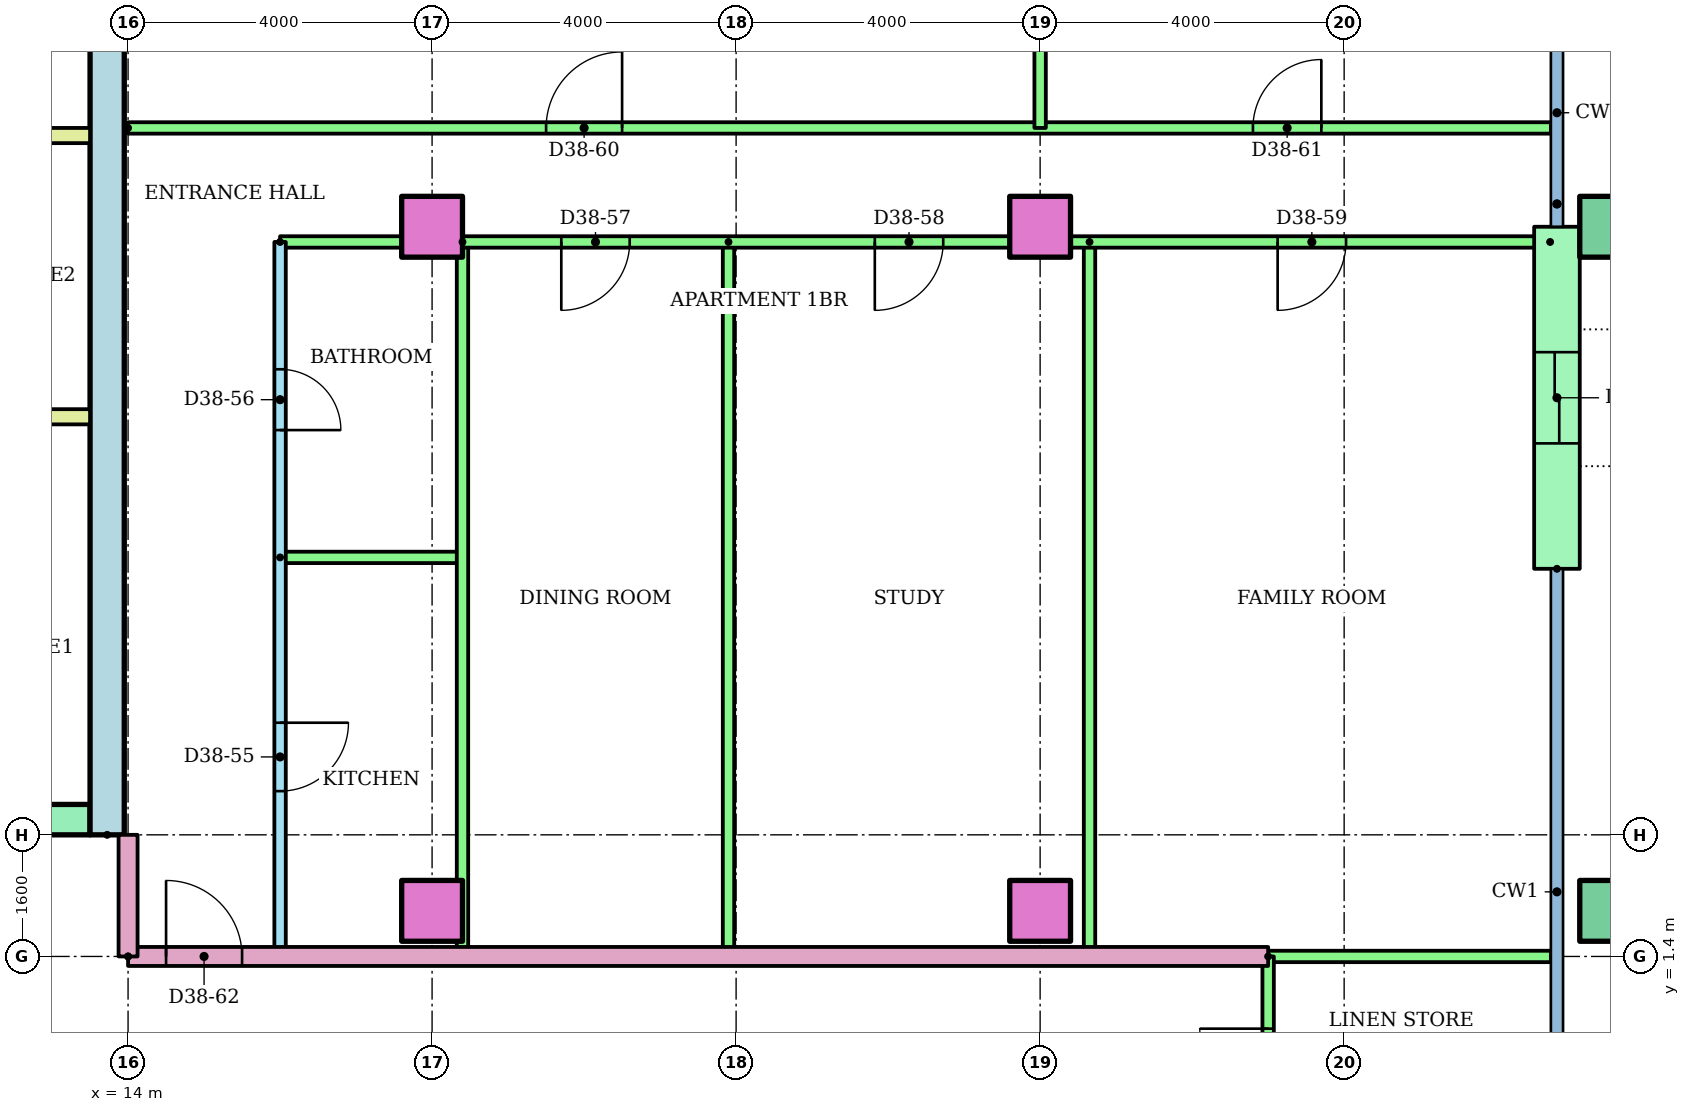
"""IFC4 building model, lengths in metres.
Left out: names, types, materials, properties, quantities, classifications, styles, units other than length and angle.
Written with IfcOpenShell. Run it as: python <this file> out.ifc"""

import sys

from ifc_helpers import new_model, si_unit, direction, frame, frame_2d, origin, origin_2d, place, context, subcontext, project, spatial, rectangle, hollow_rectangle, extrude, element, fill, save


model = new_model("IFC4")
c1 = context("Model", 3, precision=1e-05, world=origin(), true_north=direction((0.0, 1.0)))
c2 = subcontext(c1, "Body", "Model", "MODEL_VIEW")
j1 = project(units=[si_unit("LENGTHUNIT", "METRE"), si_unit("PLANEANGLEUNIT", "RADIAN")], contexts=[c1])
p1 = place(None, origin())
s1 = spatial("IfcSite", under=j1, at=p1, CompositionType="ELEMENT")
p2 = place(p1, origin())
s2 = spatial("IfcBuilding", under=s1, at=p2, CompositionType="ELEMENT")
p3 = place(p2, frame((0.0, 0.0, 145.4)))
s3 = spatial("IfcBuildingStorey", under=s2, at=p3, CompositionType="ELEMENT", Elevation=145.4)
for number, where in (
    (1, (18.0, 2.0, 0.0)),
    (2, (26.0, 2.0, 0.0)),
):
    element("IfcColumn", number, at=place(p3, frame(where)), inside=s3, PredefinedType="COLUMN", context=c2, shape_type="SweptSolid", body=[
        extrude(rectangle(XDim=0.8, YDim=0.8, at=origin_2d()), origin(), (0.0, 0.0, 1.0), 3.2),
    ])
p4 = place(p3, frame((33.5, 2.0, 0.0)))
e3 = element("IfcColumn", 3, at=p4, inside=s3, PredefinedType="COLUMN", context=c2, shape_type="SweptSolid", body=[
    extrude(hollow_rectangle(XDim=0.8, YDim=0.8, WallThickness=0.04, at=origin_2d()), origin(), (0.0, 0.0, 1.0), 3.2),
])
for number, where in (
    (4, (18.0, 11.0, 0.0)),
    (5, (26.0, 11.0, 0.0)),
):
    element("IfcColumn", number, at=place(p3, frame(where)), inside=s3, PredefinedType="COLUMN", context=c2, shape_type="SweptSolid", body=[
        extrude(rectangle(XDim=0.8, YDim=0.8, at=origin_2d()), origin(), (0.0, 0.0, 1.0), 3.2),
    ])
p5 = place(p3, frame((33.5, 11.0, 0.0)))
e6 = element("IfcColumn", 6, at=p5, inside=s3, PredefinedType="COLUMN", context=c2, shape_type="SweptSolid", body=[
    extrude(hollow_rectangle(XDim=0.8, YDim=0.8, WallThickness=0.04, at=origin_2d()), origin(), (0.0, 0.0, 1.0), 3.2),
])
p6 = place(p3, frame((32.8, 6.5, 0.0), z_axis=(0.0, 0.0, 1.0), x_axis=(0.0, 1.0, 0.0)))
e7 = element("IfcWall", 7, at=p6, inside=s3, PredefinedType="STANDARD", context=c2, shape_type="SweptSolid", body=[
    extrude(rectangle(XDim=4.5, YDim=0.6, at=frame_2d((2.25, 0.0))), origin(), (0.0, 0.0, 1.0), 2.92),
])
p7 = place(p6, frame((1.65, 0.0, 0.0)))
e8 = element("IfcOpeningElement", 8, at=p7, cuts=e7, PredefinedType="OPENING", context=c2, shape_type="SweptSolid", body=[
    extrude(rectangle(XDim=1.2, YDim=2.1, at=frame_2d((0.6, 1.05))), frame((0.0, 0.31, 0.0), z_axis=(0.0, -1.0, 0.0), x_axis=(1.0, 0.0, 0.0)), (0.0, 0.0, 1.0), 0.62),
])
p8 = place(p3, frame((13.725, 3.0, 0.0), z_axis=(0.0, 0.0, 1.0), x_axis=(0.0, 1.0, 0.0)))
e9 = element("IfcWall", 9, at=p8, inside=s3, PredefinedType="SHEAR", context=c2, shape_type="SweptSolid", body=[
    extrude(rectangle(XDim=17.0, YDim=0.45, at=frame_2d((8.5, 0.0))), origin(), (0.0, 0.0, 1.0), 2.92),
])
p9 = place(p3, frame((-13.5, 3.2, 0.0)))
e10 = element("IfcWall", 10, at=p9, inside=s3, PredefinedType="SHEAR", context=c2, shape_type="SweptSolid", body=[
    extrude(rectangle(XDim=27.0, YDim=0.4, at=frame_2d((13.5, 0.0))), origin(), (0.0, 0.0, 1.0), 2.92),
])
p10 = place(p9, frame((6.861, 0.0, 0.0)))
e11 = element("IfcOpeningElement", 11, at=p10, cuts=e10, PredefinedType="OPENING", context=c2, shape_type="SweptSolid", body=[
    extrude(rectangle(XDim=1.1, YDim=2.1, at=frame_2d((0.55, 1.05))), frame((0.0, 0.21, 0.0), z_axis=(0.0, -1.0, 0.0), x_axis=(1.0, 0.0, 0.0)), (0.0, 0.0, 1.0), 0.42),
])
p11 = place(p9, frame((9.906, 0.0, 0.0)))
e12 = element("IfcOpeningElement", 12, at=p11, cuts=e10, PredefinedType="OPENING", context=c2, shape_type="SweptSolid", body=[
    extrude(rectangle(XDim=1.1, YDim=2.1, at=frame_2d((0.55, 1.05))), frame((0.0, 0.21, 0.0), z_axis=(0.0, -1.0, 0.0), x_axis=(1.0, 0.0, 0.0)), (0.0, 0.0, 1.0), 0.42),
])
p12 = place(p9, frame((15.994, 0.0, 0.0)))
e13 = element("IfcOpeningElement", 13, at=p12, cuts=e10, PredefinedType="OPENING", context=c2, shape_type="SweptSolid", body=[
    extrude(rectangle(XDim=1.1, YDim=2.1, at=frame_2d((0.55, 1.05))), frame((0.0, 0.21, 0.0), z_axis=(0.0, -1.0, 0.0), x_axis=(1.0, 0.0, 0.0)), (0.0, 0.0, 1.0), 0.42),
])
p13 = place(p9, frame((19.039, 0.0, 0.0)))
e14 = element("IfcOpeningElement", 14, at=p13, cuts=e10, PredefinedType="OPENING", context=c2, shape_type="SweptSolid", body=[
    extrude(rectangle(XDim=1.1, YDim=2.1, at=frame_2d((0.55, 1.05))), frame((0.0, 0.21, 0.0), z_axis=(0.0, -1.0, 0.0), x_axis=(1.0, 0.0, 0.0)), (0.0, 0.0, 1.0), 0.42),
])
p14 = place(p9, frame((12.6, 0.0, 0.0)))
e15 = element("IfcOpeningElement", 15, at=p14, cuts=e10, PredefinedType="OPENING", context=c2, shape_type="SweptSolid", body=[
    extrude(rectangle(XDim=1.8, YDim=2.1, at=frame_2d((0.9, 1.05))), frame((0.0, 0.21, 0.0), z_axis=(0.0, -1.0, 0.0), x_axis=(1.0, 0.0, 0.0)), (0.0, 0.0, 1.0), 0.42),
])
for number, where in (
    (16, (9.6, 8.5, 0.0)),
    (17, (9.6, 12.2, 0.0)),
):
    element("IfcWall", number, at=place(p3, frame(where)), inside=s3, PredefinedType="PARTITIONING", context=c2, shape_type="SweptSolid", body=[
        extrude(rectangle(XDim=3.9, YDim=0.2, at=frame_2d((1.95, 0.0))), origin(), (0.0, 0.0, 1.0), 2.92),
    ])
p15 = place(p3, frame((16.0, 10.8, 0.0), z_axis=(0.0, 0.0, 1.0), x_axis=(0.0, -1.0, 0.0)))
e18 = element("IfcWall", 18, at=p15, inside=s3, PredefinedType="PARTITIONING", context=c2, shape_type="SweptSolid", body=[
    extrude(rectangle(XDim=9.4, YDim=0.15, at=frame_2d((4.7, 0.0))), origin(), (0.0, 0.0, 1.0), 2.4),
])
p16 = place(p15, frame((6.325, 0.0, 0.0)))
e19 = element("IfcOpeningElement", 19, at=p16, cuts=e18, PredefinedType="OPENING", context=c2, shape_type="SweptSolid", body=[
    extrude(rectangle(XDim=0.9, YDim=2.1, at=frame_2d((0.45, 1.05))), frame((0.0, 0.085, 0.0), z_axis=(0.0, -1.0, 0.0), x_axis=(1.0, 0.0, 0.0)), (0.0, 0.0, 1.0), 0.17),
])
p17 = place(p15, frame((1.675, 0.0, 0.0)))
e20 = element("IfcOpeningElement", 20, at=p17, cuts=e18, PredefinedType="OPENING", context=c2, shape_type="SweptSolid", body=[
    extrude(rectangle(XDim=0.8, YDim=2.1, at=frame_2d((0.4, 1.05))), frame((0.0, 0.085, 0.0), z_axis=(0.0, -1.0, 0.0), x_axis=(1.0, 0.0, 0.0)), (0.0, 0.0, 1.0), 0.17),
])
p18 = place(p3, frame((16.0, 6.65, 0.0)))
e21 = element("IfcWall", 21, at=p18, inside=s3, PredefinedType="PARTITIONING", context=c2, shape_type="SweptSolid", body=[
    extrude(rectangle(XDim=2.4, YDim=0.15, at=frame_2d((1.2, 0.0))), origin(), (0.0, 0.0, 1.0), 2.4),
])
for number, where, z_axis, x_axis in (
    (22, (18.4, 10.8, 0.0), (0.0, 0.0, 1.0), (0.0, -1.0, 0.0)),
    (23, (21.9, 10.8, 0.0), (0.0, 0.0, 1.0), (0.0, -1.0, 0.0)),
    (24, (26.65, 10.8, 0.0), (0.0, 0.0, 1.0), (0.0, -1.0, 0.0)),
):
    element("IfcWall", number, at=place(p3, frame(where, z_axis=z_axis, x_axis=x_axis)), inside=s3, PredefinedType="PARTITIONING", context=c2, shape_type="SweptSolid", body=[
        extrude(rectangle(XDim=9.4, YDim=0.15, at=frame_2d((4.7, 0.0))), origin(), (0.0, 0.0, 1.0), 2.4),
    ])
p19 = place(p3, frame((32.71, 10.8, 0.0), z_axis=(0.0, 0.0, 1.0), x_axis=(-1.0, 0.0, 0.0)))
e25 = element("IfcWall", 25, at=p19, inside=s3, PredefinedType="PARTITIONING", context=c2, shape_type="SweptSolid", body=[
    extrude(rectangle(XDim=16.71, YDim=0.15, at=frame_2d((8.355, 0.0))), origin(), (0.0, 0.0, 1.0), 2.4),
])
p20 = place(p19, frame((12.11, 0.0, 0.0)))
e26 = element("IfcOpeningElement", 26, at=p20, cuts=e25, PredefinedType="OPENING", context=c2, shape_type="SweptSolid", body=[
    extrude(rectangle(XDim=0.9, YDim=2.1, at=frame_2d((0.45, 1.05))), frame((0.0, 0.085, 0.0), z_axis=(0.0, -1.0, 0.0), x_axis=(1.0, 0.0, 0.0)), (0.0, 0.0, 1.0), 0.17),
])
p21 = place(p19, frame((7.985, 0.0, 0.0)))
e27 = element("IfcOpeningElement", 27, at=p21, cuts=e25, PredefinedType="OPENING", context=c2, shape_type="SweptSolid", body=[
    extrude(rectangle(XDim=0.9, YDim=2.1, at=frame_2d((0.45, 1.05))), frame((0.0, 0.085, 0.0), z_axis=(0.0, -1.0, 0.0), x_axis=(1.0, 0.0, 0.0)), (0.0, 0.0, 1.0), 0.17),
])
p22 = place(p19, frame((2.685, 0.0, 0.0)))
e28 = element("IfcOpeningElement", 28, at=p22, cuts=e25, PredefinedType="OPENING", context=c2, shape_type="SweptSolid", body=[
    extrude(rectangle(XDim=0.9, YDim=2.1, at=frame_2d((0.45, 1.05))), frame((0.0, 0.085, 0.0), z_axis=(0.0, -1.0, 0.0), x_axis=(1.0, 0.0, 0.0)), (0.0, 0.0, 1.0), 0.17),
])
p23 = place(p3, frame((14.0, 12.3, 0.0)))
e29 = element("IfcWall", 29, at=p23, inside=s3, PredefinedType="PARTITIONING", context=c2, shape_type="SweptSolid", body=[
    extrude(rectangle(XDim=18.72, YDim=0.15, at=frame_2d((9.36, 0.0))), origin(), (0.0, 0.0, 1.0), 2.4),
])
p24 = place(p23, frame((5.5, 0.0, 0.0)))
e30 = element("IfcOpeningElement", 30, at=p24, cuts=e29, PredefinedType="OPENING", context=c2, shape_type="SweptSolid", body=[
    extrude(rectangle(XDim=1.0, YDim=2.1, at=frame_2d((0.5, 1.05))), frame((0.0, 0.085, 0.0), z_axis=(0.0, -1.0, 0.0), x_axis=(1.0, 0.0, 0.0)), (0.0, 0.0, 1.0), 0.17),
])
p25 = place(p23, frame((14.8, 0.0, 0.0)))
e31 = element("IfcOpeningElement", 31, at=p25, cuts=e29, PredefinedType="OPENING", context=c2, shape_type="SweptSolid", body=[
    extrude(rectangle(XDim=0.9, YDim=2.1, at=frame_2d((0.45, 1.05))), frame((0.0, 0.085, 0.0), z_axis=(0.0, -1.0, 0.0), x_axis=(1.0, 0.0, 0.0)), (0.0, 0.0, 1.0), 0.17),
])
p26 = place(p3, frame((26.0, 18.721, 0.0), z_axis=(0.0, 0.0, 1.0), x_axis=(0.0, -1.0, 0.0)))
e32 = element("IfcWall", 32, at=p26, inside=s3, PredefinedType="PARTITIONING", context=c2, shape_type="SweptSolid", body=[
    extrude(rectangle(XDim=6.421, YDim=0.15, at=frame_2d((3.21, 0.0))), origin(), (0.0, 0.0, 1.0), 2.4),
])
p27 = place(p3, frame((14.0, 1.4, 0.0)))
e33 = element("IfcWall", 33, at=p27, inside=s3, PredefinedType="PARTITIONING", context=c2, shape_type="SweptSolid", body=[
    extrude(rectangle(XDim=15.0, YDim=0.25, at=frame_2d((7.5, 0.0))), origin(), (0.0, 0.0, 1.0), 2.4),
])
p28 = place(p27, frame((0.5, 0.0, 0.0)))
e34 = element("IfcOpeningElement", 34, at=p28, cuts=e33, PredefinedType="OPENING", context=c2, shape_type="SweptSolid", body=[
    extrude(rectangle(XDim=1.0, YDim=2.1, at=frame_2d((0.5, 1.05))), frame((0.0, 0.135, 0.0), z_axis=(0.0, -1.0, 0.0), x_axis=(1.0, 0.0, 0.0)), (0.0, 0.0, 1.0), 0.27),
])
p29 = place(p3, frame((29.0, 1.4, 0.0)))
e35 = element("IfcWall", 35, at=p29, inside=s3, PredefinedType="PARTITIONING", context=c2, shape_type="SweptSolid", body=[
    extrude(rectangle(XDim=3.72, YDim=0.15, at=frame_2d((1.86, 0.0))), origin(), (0.0, 0.0, 1.0), 2.4),
])
p30 = place(p3, frame((29.0, -1.4, 0.0), z_axis=(0.0, 0.0, 1.0), x_axis=(0.0, 1.0, 0.0)))
e36 = element("IfcWall", 36, at=p30, inside=s3, PredefinedType="PARTITIONING", context=c2, shape_type="SweptSolid", body=[
    extrude(rectangle(XDim=2.8, YDim=0.15, at=frame_2d((1.4, 0.0))), origin(), (0.0, 0.0, 1.0), 2.4),
])
p31 = place(p30, frame((0.95, 0.0, 0.0)))
e37 = element("IfcOpeningElement", 37, at=p31, cuts=e36, PredefinedType="OPENING", context=c2, shape_type="SweptSolid", body=[
    extrude(rectangle(XDim=0.9, YDim=2.1, at=frame_2d((0.45, 1.05))), frame((0.0, 0.085, 0.0), z_axis=(0.0, -1.0, 0.0), x_axis=(1.0, 0.0, 0.0)), (0.0, 0.0, 1.0), 0.17),
])
p32 = place(p3, frame((14.0, 1.4, 0.0), z_axis=(0.0, 0.0, 1.0), x_axis=(0.0, 1.0, 0.0)))
e38 = element("IfcWall", 38, at=p32, inside=s3, PredefinedType="PARTITIONING", context=c2, shape_type="SweptSolid", body=[
    extrude(rectangle(XDim=1.6, YDim=0.25, at=frame_2d((0.8, 0.0))), origin(), (0.0, 0.0, 1.0), 2.4),
])
p33 = place(p16, origin())
e39 = element("IfcDoor", 39, at=p33, inside=s3, OperationType="SINGLE_SWING_LEFT", PredefinedType="DOOR", context=c2, shape_type="SweptSolid", body=[
    extrude(rectangle(XDim=0.9, YDim=2.1, at=frame_2d((0.45, 1.05))), frame((0.0, 0.025, 0.0), z_axis=(0.0, -1.0, 0.0), x_axis=(1.0, 0.0, 0.0)), (0.0, 0.0, 1.0), 0.05),
])
fill(e19, e39)
p34 = place(p17, origin())
e40 = element("IfcDoor", 40, at=p34, inside=s3, OperationType="SINGLE_SWING_RIGHT", PredefinedType="DOOR", context=c2, shape_type="SweptSolid", body=[
    extrude(rectangle(XDim=0.8, YDim=2.1, at=frame_2d((0.4, 1.05))), frame((0.0, 0.025, 0.0), z_axis=(0.0, -1.0, 0.0), x_axis=(1.0, 0.0, 0.0)), (0.0, 0.0, 1.0), 0.05),
])
fill(e20, e40)
p35 = place(p20, origin())
e41 = element("IfcDoor", 41, at=p35, inside=s3, OperationType="SINGLE_SWING_RIGHT", PredefinedType="DOOR", context=c2, shape_type="SweptSolid", body=[
    extrude(rectangle(XDim=0.9, YDim=2.1, at=frame_2d((0.45, 1.05))), frame((0.0, 0.025, 0.0), z_axis=(0.0, -1.0, 0.0), x_axis=(1.0, 0.0, 0.0)), (0.0, 0.0, 1.0), 0.05),
])
fill(e26, e41)
p36 = place(p21, origin())
e42 = element("IfcDoor", 42, at=p36, inside=s3, OperationType="SINGLE_SWING_RIGHT", PredefinedType="DOOR", context=c2, shape_type="SweptSolid", body=[
    extrude(rectangle(XDim=0.9, YDim=2.1, at=frame_2d((0.45, 1.05))), frame((0.0, 0.025, 0.0), z_axis=(0.0, -1.0, 0.0), x_axis=(1.0, 0.0, 0.0)), (0.0, 0.0, 1.0), 0.05),
])
fill(e27, e42)
p37 = place(p22, origin())
e43 = element("IfcDoor", 43, at=p37, inside=s3, OperationType="SINGLE_SWING_RIGHT", PredefinedType="DOOR", context=c2, shape_type="SweptSolid", body=[
    extrude(rectangle(XDim=0.9, YDim=2.1, at=frame_2d((0.45, 1.05))), frame((0.0, 0.025, 0.0), z_axis=(0.0, -1.0, 0.0), x_axis=(1.0, 0.0, 0.0)), (0.0, 0.0, 1.0), 0.05),
])
fill(e28, e43)
p38 = place(p24, origin())
e44 = element("IfcDoor", 44, at=p38, inside=s3, OperationType="SINGLE_SWING_RIGHT", PredefinedType="DOOR", context=c2, shape_type="SweptSolid", body=[
    extrude(rectangle(XDim=1.0, YDim=2.1, at=frame_2d((0.5, 1.05))), frame((0.0, 0.025, 0.0), z_axis=(0.0, -1.0, 0.0), x_axis=(1.0, 0.0, 0.0)), (0.0, 0.0, 1.0), 0.05),
])
fill(e30, e44)
p39 = place(p25, origin())
e45 = element("IfcDoor", 45, at=p39, inside=s3, OperationType="SINGLE_SWING_RIGHT", PredefinedType="DOOR", context=c2, shape_type="SweptSolid", body=[
    extrude(rectangle(XDim=0.9, YDim=2.1, at=frame_2d((0.45, 1.05))), frame((0.0, 0.025, 0.0), z_axis=(0.0, -1.0, 0.0), x_axis=(1.0, 0.0, 0.0)), (0.0, 0.0, 1.0), 0.05),
])
fill(e31, e45)
p40 = place(p28, origin())
e46 = element("IfcDoor", 46, at=p40, inside=s3, OperationType="SINGLE_SWING_LEFT", PredefinedType="DOOR", context=c2, shape_type="SweptSolid", body=[
    extrude(rectangle(XDim=1.0, YDim=2.1, at=frame_2d((0.5, 1.05))), frame((0.0, 0.025, 0.0), z_axis=(0.0, -1.0, 0.0), x_axis=(1.0, 0.0, 0.0)), (0.0, 0.0, 1.0), 0.05),
])
fill(e34, e46)
p41 = place(p31, origin())
e47 = element("IfcDoor", 47, at=p41, inside=s3, OperationType="SINGLE_SWING_RIGHT", PredefinedType="DOOR", context=c2, shape_type="SweptSolid", body=[
    extrude(rectangle(XDim=0.9, YDim=2.1, at=frame_2d((0.45, 1.05))), frame((0.0, 0.025, 0.0), z_axis=(0.0, -1.0, 0.0), x_axis=(1.0, 0.0, 0.0)), (0.0, 0.0, 1.0), 0.05),
])
fill(e37, e47)
p42 = place(p7, origin())
e48 = element("IfcDoor", 48, at=p42, inside=s3, OperationType="SLIDING_TO_LEFT", PredefinedType="DOOR", context=c2, shape_type="SweptSolid", body=[
    extrude(rectangle(XDim=1.2, YDim=2.1, at=frame_2d((0.6, 1.05))), frame((0.0, 0.025, 0.0), z_axis=(0.0, -1.0, 0.0), x_axis=(1.0, 0.0, 0.0)), (0.0, 0.0, 1.0), 0.05),
])
fill(e8, e48)
save(model, sys.argv[1])
